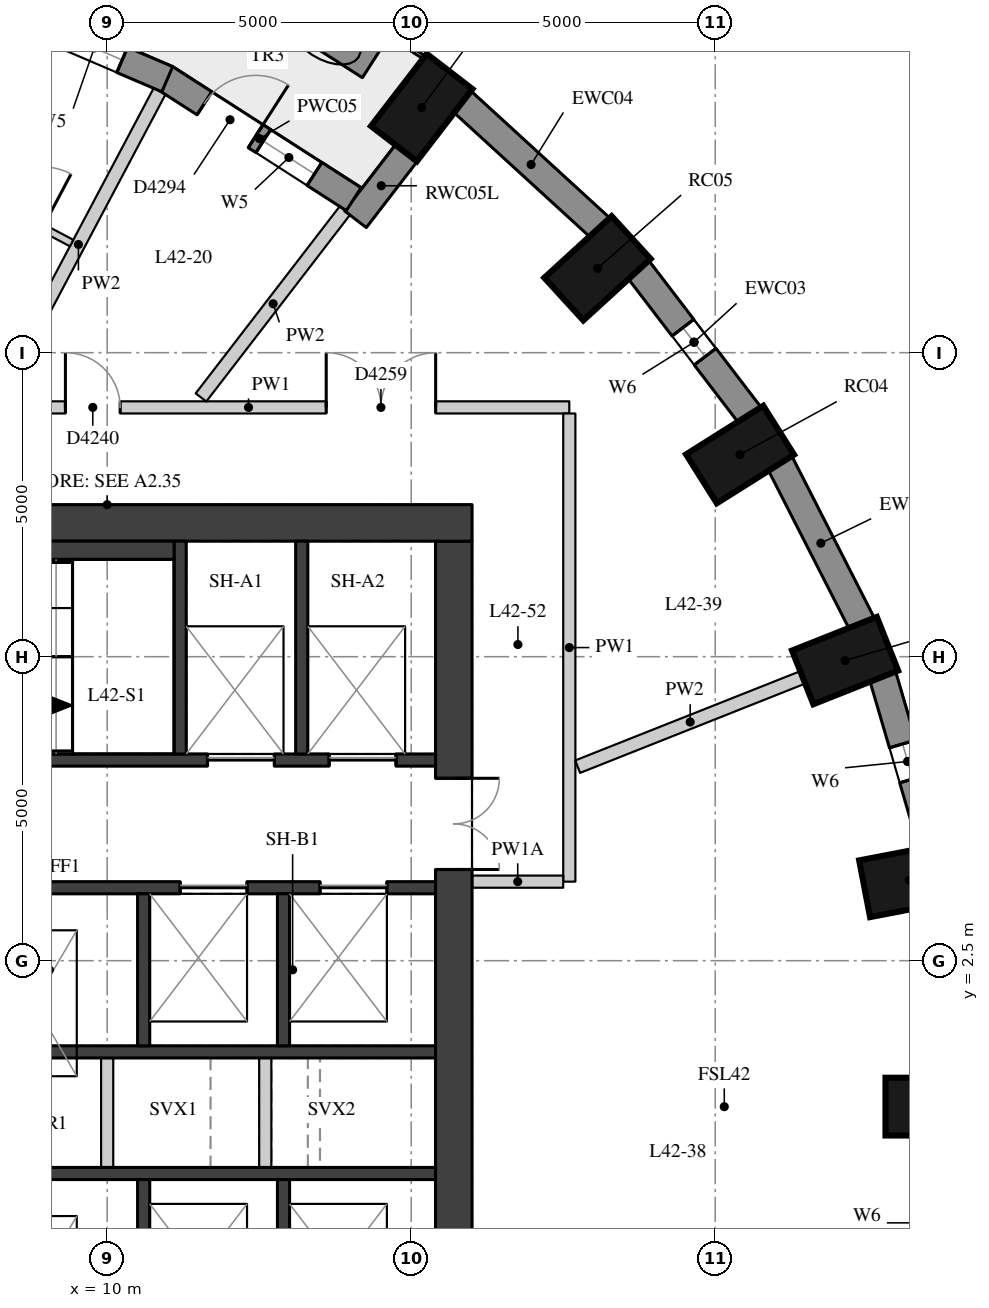
"""IFC4 building model, lengths in metres.
Left out: names, types, materials, properties, quantities, classifications, styles, units other than length and angle.
Written with IfcOpenShell. Run it as: python <this file> out.ifc"""

import sys

from ifc_helpers import new_model, si_unit, direction, frame, frame_2d, origin, origin_2d, place, context, subcontext, project, spatial, rectangle, extrude, element, fill, save


model = new_model("IFC4")
c1 = context("Model", 3, precision=1e-05, world=origin(), true_north=direction((0.0, 1.0)))
c2 = subcontext(c1, "Body", "Model", "MODEL_VIEW")
j1 = project(units=[si_unit("LENGTHUNIT", "METRE"), si_unit("PLANEANGLEUNIT", "RADIAN")], contexts=[c1])
p1 = place(None, origin())
s1 = spatial("IfcSite", under=j1, at=p1, CompositionType="ELEMENT")
p2 = place(p1, origin())
s2 = spatial("IfcBuilding", under=s1, at=p2, CompositionType="ELEMENT")
p3 = place(p2, frame((0.0, 0.0, 151.7)))
s3 = spatial("IfcBuildingStorey", under=s2, at=p3, CompositionType="ELEMENT", Elevation=151.7)
for number, where, z_axis, x_axis in (
    (1, (23.55, 0.1, 0.0), (0.0, 0.0, 1.0), (1.0, 0.0, 0.0)),
    (2, (23.194, 3.825, 0.0), (0.0, 0.0, 1.0), (0.982, 0.189, 0.0)),
    (3, (22.136, 7.436, 0.0), (0.0, 0.0, 1.0), (0.93, 0.369, 0.0)),
    (4, (20.408, 10.825, 0.0), (0.0, 0.0, 1.0), (0.846, 0.533, 0.0)),
    (5, (18.064, 13.888, 0.0), (0.0, 0.0, 1.0), (0.738, 0.675, 0.0)),
    (6, (15.173, 16.532, 0.0), (0.0, 0.0, 1.0), (0.61, 0.792, 0.0)),
):
    element("IfcColumn", number, at=place(p3, frame(where, z_axis=z_axis, x_axis=x_axis)), inside=s3, PredefinedType="COLUMN", context=c2, shape_type="SweptSolid", body=[
        extrude(rectangle(XDim=1.5, YDim=0.95, at=origin_2d()), origin(), (0.0, 0.0, 1.0), 3.3),
    ])
p4 = place(p3, frame((23.58, 4.362, 0.0), z_axis=(0.0, 0.0, 1.0), x_axis=(-0.281049481624, 0.959693278542, 0.0)))
e7 = element("IfcWall", 7, at=p4, inside=s3, PredefinedType="SOLIDWALL", context=c2, shape_type="SweptSolid", body=[
    extrude(rectangle(XDim=2.948, YDim=0.45, at=frame_2d((1.474, 0.0))), origin(), (0.0, 0.0, 1.0), 3.02),
])
p5 = place(p4, frame((1.174, 0.0, 0.4)))
e8 = element("IfcOpeningElement", 8, at=p5, cuts=e7, PredefinedType="OPENING", context=c2, shape_type="SweptSolid", body=[
    extrude(rectangle(XDim=0.6, YDim=1.75, at=frame_2d((0.3, 0.875))), frame((0.0, 0.235, 0.0), z_axis=(0.0, -1.0, 0.0), x_axis=(1.0, 0.0, 0.0)), (0.0, 0.0, 1.0), 0.47),
])
p6 = place(p3, frame((22.415, 8.037, 0.0), z_axis=(0.0, 0.0, 1.0), x_axis=(-0.454133999889, 0.890933392653, 0.0)))
e9 = element("IfcWall", 9, at=p6, inside=s3, PredefinedType="SOLIDWALL", context=c2, shape_type="SweptSolid", body=[
    extrude(rectangle(XDim=2.986, YDim=0.45, at=frame_2d((1.493, 0.0))), origin(), (0.0, 0.0, 1.0), 3.02),
])
p7 = place(p3, frame((20.574, 11.467, 0.0), z_axis=(0.0, 0.0, 1.0), x_axis=(-0.607817056371, 0.794077090706, 0.0)))
e10 = element("IfcWall", 10, at=p7, inside=s3, PredefinedType="SOLIDWALL", context=c2, shape_type="SweptSolid", body=[
    extrude(rectangle(XDim=3.037, YDim=0.45, at=frame_2d((1.519, 0.0))), origin(), (0.0, 0.0, 1.0), 3.02),
])
p8 = place(p7, frame((1.219, 0.0, 0.4)))
e11 = element("IfcOpeningElement", 11, at=p8, cuts=e10, PredefinedType="OPENING", context=c2, shape_type="SweptSolid", body=[
    extrude(rectangle(XDim=0.6, YDim=1.75, at=frame_2d((0.3, 0.875))), frame((0.0, 0.235, 0.0), z_axis=(0.0, -1.0, 0.0), x_axis=(1.0, 0.0, 0.0)), (0.0, 0.0, 1.0), 0.47),
])
p9 = place(p3, frame((18.113, 14.55, 0.0), z_axis=(0.0, 0.0, 1.0), x_axis=(-0.737808755941, 0.675009807082, 0.0)))
e12 = element("IfcWall", 12, at=p9, inside=s3, PredefinedType="SOLIDWALL", context=c2, shape_type="SweptSolid", body=[
    extrude(rectangle(XDim=3.094, YDim=0.45, at=frame_2d((1.547, 0.0))), origin(), (0.0, 0.0, 1.0), 3.02),
])
p10 = place(p3, frame((14.931, 15.797, 0.0), z_axis=(0.0, 0.0, 1.0), x_axis=(-0.609897399413, -0.792480385996, 0.0)))
e13 = element("IfcWall", 13, at=p10, inside=s3, PredefinedType="SOLIDWALL", context=c2, shape_type="SweptSolid", body=[
    extrude(rectangle(XDim=1.391, YDim=0.45, at=frame_2d((0.695, 0.0))), origin(), (0.0, 0.0, 1.0), 3.02),
])
p11 = place(p3, frame((14.054, 15.025, 0.0), z_axis=(0.0, 0.0, 1.0), x_axis=(-0.841393801846, 0.54042249233, 0.0)))
e14 = element("IfcWall", 14, at=p11, inside=s3, PredefinedType="SOLIDWALL", context=c2, shape_type="SweptSolid", body=[
    extrude(rectangle(XDim=3.683, YDim=0.45, at=frame_2d((1.841, 0.0))), origin(), (0.0, 0.0, 1.0), 3.02),
])
p12 = place(p11, frame((0.766, 0.0, 0.4)))
e15 = element("IfcOpeningElement", 15, at=p12, cuts=e14, PredefinedType="OPENING", context=c2, shape_type="SweptSolid", body=[
    extrude(rectangle(XDim=1.0, YDim=1.75, at=frame_2d((0.5, 0.875))), frame((0.0, 0.235, 0.0), z_axis=(0.0, -1.0, 0.0), x_axis=(1.0, 0.0, 0.0)), (0.0, 0.0, 1.0), 0.47),
])
p13 = place(p11, frame((1.916, 0.0, 0.0)))
e16 = element("IfcOpeningElement", 16, at=p13, cuts=e14, PredefinedType="OPENING", context=c2, shape_type="SweptSolid", body=[
    extrude(rectangle(XDim=1.0, YDim=2.15, at=frame_2d((0.5, 1.075))), frame((0.0, 0.235, 0.0), z_axis=(0.0, -1.0, 0.0), x_axis=(1.0, 0.0, 0.0)), (0.0, 0.0, 1.0), 0.47),
])
p14 = place(p3, frame((10.988, 16.998, 0.0), z_axis=(0.0, 0.0, 1.0), x_axis=(-0.919443425894, 0.393222311907, 0.0)))
e17 = element("IfcWall", 17, at=p14, inside=s3, PredefinedType="SOLIDWALL", context=c2, shape_type="SweptSolid", body=[
    extrude(rectangle(XDim=3.763, YDim=0.45, at=frame_2d((1.882, 0.0))), origin(), (0.0, 0.0, 1.0), 3.02),
])
p15 = place(p14, frame((0.807, 0.0, 0.4)))
e18 = element("IfcOpeningElement", 18, at=p15, cuts=e17, PredefinedType="OPENING", context=c2, shape_type="SweptSolid", body=[
    extrude(rectangle(XDim=1.0, YDim=1.75, at=frame_2d((0.5, 0.875))), frame((0.0, 0.235, 0.0), z_axis=(0.0, -1.0, 0.0), x_axis=(1.0, 0.0, 0.0)), (0.0, 0.0, 1.0), 0.47),
])
p16 = place(p14, frame((1.957, 0.0, 0.0)))
e19 = element("IfcOpeningElement", 19, at=p16, cuts=e17, PredefinedType="OPENING", context=c2, shape_type="SweptSolid", body=[
    extrude(rectangle(XDim=1.0, YDim=2.15, at=frame_2d((0.5, 1.075))), frame((0.0, 0.235, 0.0), z_axis=(0.0, -1.0, 0.0), x_axis=(1.0, 0.0, 0.0)), (0.0, 0.0, 1.0), 0.47),
])
p17 = place(p3, frame((14.386, 17.318, 0.0), z_axis=(0.0, 0.0, 1.0), x_axis=(-0.842032375698, 0.539426990682, 0.0)))
e20 = element("IfcWall", 20, at=p17, inside=s3, PredefinedType="USERDEFINED", context=c2, shape_type="SweptSolid", body=[
    extrude(rectangle(XDim=1.8, YDim=0.7, at=frame_2d((0.9, 0.0))), origin(), (0.0, 0.0, 1.0), 0.75),
])
p18 = place(p3, frame((15.7, -9.4, 0.0), z_axis=(0.0, 0.0, 1.0), x_axis=(0.0, 1.0, 0.0)))
e21 = element("IfcWall", 21, at=p18, inside=s3, PredefinedType="SHEAR", context=c2, shape_type="SweptSolid", body=[
    extrude(rectangle(XDim=18.8, YDim=0.6, at=frame_2d((9.4, 0.0))), origin(), (0.0, 0.0, 1.0), 3.02),
])
p19 = place(p18, frame((13.4, 0.0, 0.0)))
e22 = element("IfcOpeningElement", 22, at=p19, cuts=e21, PredefinedType="OPENING", context=c2, shape_type="SweptSolid", body=[
    extrude(rectangle(XDim=1.5, YDim=2.1, at=frame_2d((0.75, 1.05))), frame((0.0, 0.31, 0.0), z_axis=(0.0, -1.0, 0.0), x_axis=(1.0, 0.0, 0.0)), (0.0, 0.0, 1.0), 0.62),
])
p20 = place(p18, frame((3.9, 0.0, 0.0)))
e23 = element("IfcOpeningElement", 23, at=p20, cuts=e21, PredefinedType="OPENING", context=c2, shape_type="SweptSolid", body=[
    extrude(rectangle(XDim=1.5, YDim=2.1, at=frame_2d((0.75, 1.05))), frame((0.0, 0.31, 0.0), z_axis=(0.0, -1.0, 0.0), x_axis=(1.0, 0.0, 0.0)), (0.0, 0.0, 1.0), 0.62),
])
p21 = place(p3, frame((4.0, 9.7, 0.0), z_axis=(0.0, 0.0, 1.0), x_axis=(1.0, 0.0, 0.0)))
e24 = element("IfcWall", 24, at=p21, inside=s3, PredefinedType="SHEAR", context=c2, shape_type="SweptSolid", body=[
    extrude(rectangle(XDim=12.0, YDim=0.6, at=frame_2d((6.0, 0.0))), origin(), (0.0, 0.0, 1.0), 3.02),
])
p22 = place(p3, frame((4.6, 5.8, 0.0), z_axis=(0.0, 0.0, 1.0), x_axis=(1.0, 0.0, 0.0)))
e25 = element("IfcWall", 25, at=p22, inside=s3, PredefinedType="SHEAR", context=c2, shape_type="SweptSolid", body=[
    extrude(rectangle(XDim=10.8, YDim=0.2, at=frame_2d((5.4, 0.0))), origin(), (0.0, 0.0, 1.0), 3.02),
])
p23 = place(p22, frame((7.05, 0.0, 0.0)))
e26 = element("IfcOpeningElement", 26, at=p23, cuts=e25, PredefinedType="OPENING", context=c2, shape_type="SweptSolid", body=[
    extrude(rectangle(XDim=1.1, YDim=2.1, at=frame_2d((0.55, 1.05))), frame((0.0, 0.11, 0.0), z_axis=(0.0, -1.0, 0.0), x_axis=(1.0, 0.0, 0.0)), (0.0, 0.0, 1.0), 0.22),
])
p24 = place(p22, frame((9.05, 0.0, 0.0)))
e27 = element("IfcOpeningElement", 27, at=p24, cuts=e25, PredefinedType="OPENING", context=c2, shape_type="SweptSolid", body=[
    extrude(rectangle(XDim=1.1, YDim=2.1, at=frame_2d((0.55, 1.05))), frame((0.0, 0.11, 0.0), z_axis=(0.0, -1.0, 0.0), x_axis=(1.0, 0.0, 0.0)), (0.0, 0.0, 1.0), 0.22),
])
p25 = place(p3, frame((4.6, 3.7, 0.0), z_axis=(0.0, 0.0, 1.0), x_axis=(1.0, 0.0, 0.0)))
e28 = element("IfcWall", 28, at=p25, inside=s3, PredefinedType="SHEAR", context=c2, shape_type="SweptSolid", body=[
    extrude(rectangle(XDim=10.8, YDim=0.2, at=frame_2d((5.4, 0.0))), origin(), (0.0, 0.0, 1.0), 3.02),
])
p26 = place(p25, frame((6.6, 0.0, 0.0)))
e29 = element("IfcOpeningElement", 29, at=p26, cuts=e28, PredefinedType="OPENING", context=c2, shape_type="SweptSolid", body=[
    extrude(rectangle(XDim=1.1, YDim=2.1, at=frame_2d((0.55, 1.05))), frame((0.0, 0.11, 0.0), z_axis=(0.0, -1.0, 0.0), x_axis=(1.0, 0.0, 0.0)), (0.0, 0.0, 1.0), 0.22),
])
p27 = place(p25, frame((8.9, 0.0, 0.0)))
e30 = element("IfcOpeningElement", 30, at=p27, cuts=e28, PredefinedType="OPENING", context=c2, shape_type="SweptSolid", body=[
    extrude(rectangle(XDim=1.1, YDim=2.1, at=frame_2d((0.55, 1.05))), frame((0.0, 0.11, 0.0), z_axis=(0.0, -1.0, 0.0), x_axis=(1.0, 0.0, 0.0)), (0.0, 0.0, 1.0), 0.22),
])
for number, where, z_axis, x_axis in (
    (31, (4.6, 1.0, 0.0), (0.0, 0.0, 1.0), (1.0, 0.0, 0.0)),
    (32, (4.6, -1.0, 0.0), (0.0, 0.0, 1.0), (1.0, 0.0, 0.0)),
):
    element("IfcWall", number, at=place(p3, frame(where, z_axis=z_axis, x_axis=x_axis)), inside=s3, PredefinedType="SHEAR", context=c2, shape_type="SweptSolid", body=[
        extrude(rectangle(XDim=10.8, YDim=0.2, at=frame_2d((5.4, 0.0))), origin(), (0.0, 0.0, 1.0), 3.02),
    ])
for number, where, z_axis, x_axis in (
    (33, (11.2, 5.9, 0.0), (0.0, 0.0, 1.0), (0.0, 1.0, 0.0)),
    (34, (13.2, 5.9, 0.0), (0.0, 0.0, 1.0), (0.0, 1.0, 0.0)),
):
    element("IfcWall", number, at=place(p3, frame(where, z_axis=z_axis, x_axis=x_axis)), inside=s3, PredefinedType="SHEAR", context=c2, shape_type="SweptSolid", body=[
        extrude(rectangle(XDim=3.5, YDim=0.2, at=frame_2d((1.75, 0.0))), origin(), (0.0, 0.0, 1.0), 3.02),
    ])
for number, where, z_axis, x_axis in (
    (35, (10.6, 1.1, 0.0), (0.0, 0.0, 1.0), (0.0, 1.0, 0.0)),
    (36, (10.6, -3.6, 0.0), (0.0, 0.0, 1.0), (0.0, 1.0, 0.0)),
    (37, (12.9, 1.1, 0.0), (0.0, 0.0, 1.0), (0.0, 1.0, 0.0)),
    (38, (12.9, -3.6, 0.0), (0.0, 0.0, 1.0), (0.0, 1.0, 0.0)),
):
    element("IfcWall", number, at=place(p3, frame(where, z_axis=z_axis, x_axis=x_axis)), inside=s3, PredefinedType="SHEAR", context=c2, shape_type="SweptSolid", body=[
        extrude(rectangle(XDim=2.5, YDim=0.2, at=frame_2d((1.25, 0.0))), origin(), (0.0, 0.0, 1.0), 3.02),
    ])
for number, where, z_axis, x_axis in (
    (39, (10.0, -0.9, 0.0), (0.0, 0.0, 1.0), (0.0, 1.0, 0.0)),
    (40, (12.6, -0.9, 0.0), (0.0, 0.0, 1.0), (0.0, 1.0, 0.0)),
):
    element("IfcWall", number, at=place(p3, frame(where, z_axis=z_axis, x_axis=x_axis)), inside=s3, PredefinedType="PARTITIONING", context=c2, shape_type="SweptSolid", body=[
        extrude(rectangle(XDim=1.8, YDim=0.2, at=frame_2d((0.9, 0.0))), origin(), (0.0, 0.0, 1.0), 3.02),
    ])
p28 = place(p3, frame((6.22, 9.25, 0.0), z_axis=(0.0, 0.0, 1.0), x_axis=(1.0, 0.0, 0.0)))
e41 = element("IfcWall", 41, at=p28, inside=s3, PredefinedType="PARTITIONING", context=c2, shape_type="SweptSolid", body=[
    extrude(rectangle(XDim=4.88, YDim=0.3, at=frame_2d((2.44, 0.0))), origin(), (0.0, 0.0, 1.0), 3.02),
])
p29 = place(p3, frame((7.05, 11.6, 0.0), z_axis=(0.0, 0.0, 1.0), x_axis=(1.0, 0.0, 0.0)))
e42 = element("IfcWall", 42, at=p29, inside=s3, PredefinedType="PARTITIONING", context=c2, shape_type="SweptSolid", body=[
    extrude(rectangle(XDim=10.551, YDim=0.2, at=frame_2d((5.275, 0.0))), origin(), (0.0, 0.0, 1.0), 3.02),
])
p30 = place(p29, frame((2.264, 0.0, 0.0)))
e43 = element("IfcOpeningElement", 43, at=p30, cuts=e42, PredefinedType="OPENING", context=c2, shape_type="SweptSolid", body=[
    extrude(rectangle(XDim=0.9, YDim=2.1, at=frame_2d((0.45, 1.05))), frame((0.0, 0.11, 0.0), z_axis=(0.0, -1.0, 0.0), x_axis=(1.0, 0.0, 0.0)), (0.0, 0.0, 1.0), 0.22),
])
p31 = place(p29, frame((6.553, 0.0, 0.0)))
e44 = element("IfcOpeningElement", 44, at=p31, cuts=e42, PredefinedType="OPENING", context=c2, shape_type="SweptSolid", body=[
    extrude(rectangle(XDim=1.8, YDim=2.1, at=frame_2d((0.9, 1.05))), frame((0.0, 0.11, 0.0), z_axis=(0.0, -1.0, 0.0), x_axis=(1.0, 0.0, 0.0)), (0.0, 0.0, 1.0), 0.22),
])
p32 = place(p3, frame((17.6, 11.5, 0.0), z_axis=(0.0, 0.0, 1.0), x_axis=(0.0, -1.0, 0.0)))
e45 = element("IfcWall", 45, at=p32, inside=s3, PredefinedType="PARTITIONING", context=c2, shape_type="SweptSolid", body=[
    extrude(rectangle(XDim=7.7, YDim=0.2, at=frame_2d((3.85, 0.0))), origin(), (0.0, 0.0, 1.0), 3.02),
])
p33 = place(p3, frame((17.5, 3.8, 0.0), z_axis=(0.0, 0.0, 1.0), x_axis=(-1.0, 0.0, 0.0)))
e46 = element("IfcWall", 46, at=p33, inside=s3, PredefinedType="PARTITIONING", context=c2, shape_type="SweptSolid", body=[
    extrude(rectangle(XDim=1.496, YDim=0.2, at=frame_2d((0.748, 0.0))), origin(), (0.0, 0.0, 1.0), 2.57),
])
p34 = place(p3, frame((21.439, 7.16, 0.0), z_axis=(0.0, 0.0, 1.0), x_axis=(-0.929517399972, -0.368778257426, 0.0)))
e47 = element("IfcWall", 47, at=p34, inside=s3, PredefinedType="PARTITIONING", context=c2, shape_type="SweptSolid", body=[
    extrude(rectangle(XDim=3.982, YDim=0.22, at=frame_2d((1.991, 0.0))), origin(), (0.0, 0.0, 1.0), 3.02),
])
p35 = place(p3, frame((13.916, 14.846, 0.0), z_axis=(0.0, 0.0, 1.0), x_axis=(-0.610023079405, -0.792383646091, 0.0)))
e48 = element("IfcWall", 48, at=p35, inside=s3, PredefinedType="PARTITIONING", context=c2, shape_type="SweptSolid", body=[
    extrude(rectangle(XDim=3.89, YDim=0.22, at=frame_2d((1.945, 0.0))), origin(), (0.0, 0.0, 1.0), 3.02),
])
p36 = place(p3, frame((10.865, 16.806, 0.0), z_axis=(0.0, 0.0, 1.0), x_axis=(-0.468046615648, -0.883703777054, 0.0)))
e49 = element("IfcWall", 49, at=p36, inside=s3, PredefinedType="PARTITIONING", context=c2, shape_type="SweptSolid", body=[
    extrude(rectangle(XDim=5.718, YDim=0.22, at=frame_2d((2.859, 0.0))), origin(), (0.0, 0.0, 1.0), 3.02),
])
p37 = place(p3, frame((7.532, 15.3, 0.0), z_axis=(0.0, 0.0, 1.0), x_axis=(0.883707061275, -0.468040414764, 0.0)))
e50 = element("IfcWall", 50, at=p37, inside=s3, PredefinedType="PARTITIONING", context=c2, shape_type="SweptSolid", body=[
    extrude(rectangle(XDim=2.13, YDim=0.12, at=frame_2d((1.065, 0.0))), origin(), (0.0, 0.0, 1.0), 3.02),
])
p38 = place(p37, frame((0.59, 0.0, 0.0)))
e51 = element("IfcOpeningElement", 51, at=p38, cuts=e50, PredefinedType="OPENING", context=c2, shape_type="SweptSolid", body=[
    extrude(rectangle(XDim=1.0, YDim=2.1, at=frame_2d((0.5, 1.05))), frame((0.0, 0.07, 0.0), z_axis=(0.0, -1.0, 0.0), x_axis=(1.0, 0.0, 0.0)), (0.0, 0.0, 1.0), 0.14),
])
p39 = place(p5, origin())
e52 = element("IfcWindow", 52, at=p39, inside=s3, PartitioningType="SINGLE_PANEL", PredefinedType="WINDOW", context=c2, shape_type="SweptSolid", body=[
    extrude(rectangle(XDim=0.6, YDim=1.75, at=frame_2d((0.3, 0.875))), frame((0.0, 0.035, 0.0), z_axis=(0.0, -1.0, 0.0), x_axis=(1.0, 0.0, 0.0)), (0.0, 0.0, 1.0), 0.06),
])
fill(e8, e52)
p40 = place(p8, origin())
e53 = element("IfcWindow", 53, at=p40, inside=s3, PartitioningType="SINGLE_PANEL", PredefinedType="WINDOW", context=c2, shape_type="SweptSolid", body=[
    extrude(rectangle(XDim=0.6, YDim=1.75, at=frame_2d((0.3, 0.875))), frame((0.0, 0.035, 0.0), z_axis=(0.0, -1.0, 0.0), x_axis=(1.0, 0.0, 0.0)), (0.0, 0.0, 1.0), 0.06),
])
fill(e11, e53)
p41 = place(p12, origin())
e54 = element("IfcWindow", 54, at=p41, inside=s3, PartitioningType="SINGLE_PANEL", PredefinedType="WINDOW", context=c2, shape_type="SweptSolid", body=[
    extrude(rectangle(XDim=1.0, YDim=1.75, at=frame_2d((0.5, 0.875))), frame((0.0, 0.035, 0.0), z_axis=(0.0, -1.0, 0.0), x_axis=(1.0, 0.0, 0.0)), (0.0, 0.0, 1.0), 0.06),
])
fill(e15, e54)
p42 = place(p13, frame((1.0, 0.0, 0.0), z_axis=(0.0, 0.0, 1.0), x_axis=(-1.0, 0.0, 0.0)))
e55 = element("IfcDoor", 55, at=p42, inside=s3, OperationType="SINGLE_SWING_RIGHT", PredefinedType="DOOR", context=c2, shape_type="SweptSolid", body=[
    extrude(rectangle(XDim=1.0, YDim=2.15, at=frame_2d((0.5, 1.075))), frame((0.0, 0.075, 0.0), z_axis=(0.0, -1.0, 0.0), x_axis=(1.0, 0.0, 0.0)), (0.0, 0.0, 1.0), 0.05),
])
fill(e16, e55)
p43 = place(p15, origin())
e56 = element("IfcWindow", 56, at=p43, inside=s3, PartitioningType="SINGLE_PANEL", PredefinedType="WINDOW", context=c2, shape_type="SweptSolid", body=[
    extrude(rectangle(XDim=1.0, YDim=1.75, at=frame_2d((0.5, 0.875))), frame((0.0, 0.035, 0.0), z_axis=(0.0, -1.0, 0.0), x_axis=(1.0, 0.0, 0.0)), (0.0, 0.0, 1.0), 0.06),
])
fill(e18, e56)
p44 = place(p19, origin())
e57 = element("IfcDoor", 57, at=p44, inside=s3, OperationType="DOUBLE_DOOR_SINGLE_SWING", PredefinedType="DOOR", context=c2, shape_type="SweptSolid", body=[
    extrude(rectangle(XDim=1.5, YDim=2.1, at=frame_2d((0.75, 1.05))), frame((0.0, 0.025, 0.0), z_axis=(0.0, -1.0, 0.0), x_axis=(1.0, 0.0, 0.0)), (0.0, 0.0, 1.0), 0.05),
])
fill(e22, e57)
p45 = place(p23, origin())
e58 = element("IfcDoor", 58, at=p45, inside=s3, OperationType="DOUBLE_DOOR_SLIDING", PredefinedType="DOOR", context=c2, shape_type="SweptSolid", body=[
    extrude(rectangle(XDim=1.1, YDim=2.1, at=frame_2d((0.55, 1.05))), frame((0.0, 0.025, 0.0), z_axis=(0.0, -1.0, 0.0), x_axis=(1.0, 0.0, 0.0)), (0.0, 0.0, 1.0), 0.05),
])
fill(e26, e58)
p46 = place(p24, origin())
e59 = element("IfcDoor", 59, at=p46, inside=s3, OperationType="DOUBLE_DOOR_SLIDING", PredefinedType="DOOR", context=c2, shape_type="SweptSolid", body=[
    extrude(rectangle(XDim=1.1, YDim=2.1, at=frame_2d((0.55, 1.05))), frame((0.0, 0.025, 0.0), z_axis=(0.0, -1.0, 0.0), x_axis=(1.0, 0.0, 0.0)), (0.0, 0.0, 1.0), 0.05),
])
fill(e27, e59)
p47 = place(p26, origin())
e60 = element("IfcDoor", 60, at=p47, inside=s3, OperationType="DOUBLE_DOOR_SLIDING", PredefinedType="DOOR", context=c2, shape_type="SweptSolid", body=[
    extrude(rectangle(XDim=1.1, YDim=2.1, at=frame_2d((0.55, 1.05))), frame((0.0, 0.025, 0.0), z_axis=(0.0, -1.0, 0.0), x_axis=(1.0, 0.0, 0.0)), (0.0, 0.0, 1.0), 0.05),
])
fill(e29, e60)
p48 = place(p27, origin())
e61 = element("IfcDoor", 61, at=p48, inside=s3, OperationType="DOUBLE_DOOR_SLIDING", PredefinedType="DOOR", context=c2, shape_type="SweptSolid", body=[
    extrude(rectangle(XDim=1.1, YDim=2.1, at=frame_2d((0.55, 1.05))), frame((0.0, 0.025, 0.0), z_axis=(0.0, -1.0, 0.0), x_axis=(1.0, 0.0, 0.0)), (0.0, 0.0, 1.0), 0.05),
])
fill(e30, e61)
p49 = place(p30, origin())
e62 = element("IfcDoor", 62, at=p49, inside=s3, OperationType="SINGLE_SWING_LEFT", PredefinedType="DOOR", context=c2, shape_type="SweptSolid", body=[
    extrude(rectangle(XDim=0.9, YDim=2.1, at=frame_2d((0.45, 1.05))), frame((0.0, 0.025, 0.0), z_axis=(0.0, -1.0, 0.0), x_axis=(1.0, 0.0, 0.0)), (0.0, 0.0, 1.0), 0.05),
])
fill(e43, e62)
p50 = place(p31, origin())
e63 = element("IfcDoor", 63, at=p50, inside=s3, OperationType="DOUBLE_DOOR_SINGLE_SWING", PredefinedType="DOOR", context=c2, shape_type="SweptSolid", body=[
    extrude(rectangle(XDim=1.8, YDim=2.1, at=frame_2d((0.9, 1.05))), frame((0.0, 0.025, 0.0), z_axis=(0.0, -1.0, 0.0), x_axis=(1.0, 0.0, 0.0)), (0.0, 0.0, 1.0), 0.05),
])
fill(e44, e63)
save(model, sys.argv[1])
